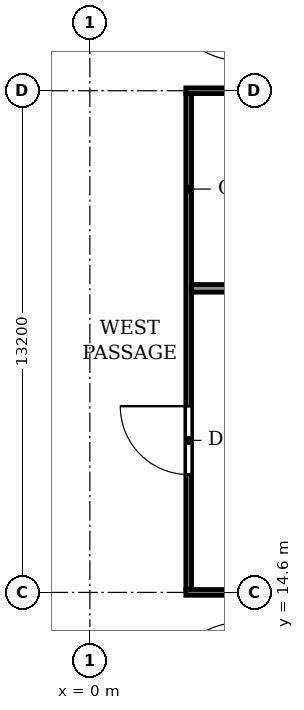
"""IFC4 building model, lengths in metres.
Left out: names, types, materials, properties, quantities, classifications, styles, units other than length and angle.
Written with IfcOpenShell. Run it as: python <this file> out.ifc"""

import sys

from ifc_helpers import new_model, si_unit, direction, frame, frame_2d, origin, place, context, subcontext, project, spatial, rectangle, extrude, element, fill, save


model = new_model("IFC4")
c1 = context("Model", 3, precision=1e-05, world=origin(), true_north=direction((0.0, 1.0)))
c2 = subcontext(c1, "Body", "Model", "MODEL_VIEW")
j1 = project(units=[si_unit("LENGTHUNIT", "METRE"), si_unit("PLANEANGLEUNIT", "RADIAN")], contexts=[c1])
p1 = place(None, origin())
s1 = spatial("IfcSite", under=j1, at=p1, CompositionType="ELEMENT")
p2 = place(p1, origin())
s2 = spatial("IfcBuilding", under=s1, at=p2, CompositionType="ELEMENT")
p3 = place(p2, frame((0.0, 0.0, 6.0)))
s3 = spatial("IfcBuildingStorey", under=s2, at=p3, CompositionType="ELEMENT", Elevation=6.0)
p4 = place(p3, frame((2.525, 14.6, 0.0), z_axis=(0.0, 0.0, 1.0), x_axis=(1.0, 0.0, 0.0)))
e1 = element("IfcWall", 1, at=p4, inside=s3, PredefinedType="PARTITIONING", context=c2, shape_type="SweptSolid", body=[
    extrude(rectangle(XDim=15.465, YDim=0.15, at=frame_2d((7.732, 0.0))), origin(), (0.0, 0.0, 1.0), 4.52),
])
p5 = place(p4, frame((11.175, 0.0, 0.0)))
e2 = element("IfcOpeningElement", 2, at=p5, cuts=e1, PredefinedType="OPENING", context=c2, shape_type="SweptSolid", body=[
    extrude(rectangle(XDim=0.9, YDim=2.1, at=frame_2d((0.45, 1.05))), frame((0.0, 0.085, 0.0), z_axis=(0.0, -1.0, 0.0), x_axis=(1.0, 0.0, 0.0)), (0.0, 0.0, 1.0), 0.17),
])
p6 = place(p3, frame((2.525, 27.8, 0.0), z_axis=(0.0, 0.0, 1.0), x_axis=(1.0, 0.0, 0.0)))
e3 = element("IfcWall", 3, at=p6, inside=s3, PredefinedType="PARTITIONING", context=c2, shape_type="SweptSolid", body=[
    extrude(rectangle(XDim=15.465, YDim=0.15, at=frame_2d((7.732, 0.0))), origin(), (0.0, 0.0, 1.0), 4.52),
])
p7 = place(p6, frame((3.475, 0.0, 0.0)))
e4 = element("IfcOpeningElement", 4, at=p7, cuts=e3, PredefinedType="OPENING", context=c2, shape_type="SweptSolid", body=[
    extrude(rectangle(XDim=0.9, YDim=2.1, at=frame_2d((0.45, 1.05))), frame((0.0, 0.085, 0.0), z_axis=(0.0, -1.0, 0.0), x_axis=(1.0, 0.0, 0.0)), (0.0, 0.0, 1.0), 0.17),
])
p8 = place(p6, frame((11.175, 0.0, 0.0)))
e5 = element("IfcOpeningElement", 5, at=p8, cuts=e3, PredefinedType="OPENING", context=c2, shape_type="SweptSolid", body=[
    extrude(rectangle(XDim=0.9, YDim=2.1, at=frame_2d((0.45, 1.05))), frame((0.0, 0.085, 0.0), z_axis=(0.0, -1.0, 0.0), x_axis=(1.0, 0.0, 0.0)), (0.0, 0.0, 1.0), 0.17),
])
p9 = place(p3, frame((2.6, 14.675, 0.0), z_axis=(0.0, 0.0, 1.0), x_axis=(0.0, 1.0, 0.0)))
e6 = element("IfcWall", 6, at=p9, inside=s3, PredefinedType="PARTITIONING", context=c2, shape_type="SweptSolid", body=[
    extrude(rectangle(XDim=13.05, YDim=0.15, at=frame_2d((6.525, 0.0))), origin(), (0.0, 0.0, 1.0), 4.52),
])
p10 = place(p9, frame((3.025, 0.0, 0.0)))
e7 = element("IfcOpeningElement", 7, at=p10, cuts=e6, PredefinedType="OPENING", context=c2, shape_type="SweptSolid", body=[
    extrude(rectangle(XDim=1.8, YDim=2.1, at=frame_2d((0.9, 1.05))), frame((0.0, 0.085, 0.0), z_axis=(0.0, -1.0, 0.0), x_axis=(1.0, 0.0, 0.0)), (0.0, 0.0, 1.0), 0.17),
])
p11 = place(p3, frame((2.675, 22.6, 0.0), z_axis=(0.0, 0.0, 1.0), x_axis=(1.0, 0.0, 0.0)))
e8 = element("IfcWall", 8, at=p11, inside=s3, PredefinedType="PARTITIONING", context=c2, shape_type="SweptSolid", body=[
    extrude(rectangle(XDim=15.25, YDim=0.2, at=frame_2d((7.625, 0.0))), origin(), (0.0, 0.0, 1.0), 4.52),
])
p12 = place(p10, origin())
e9 = element("IfcDoor", 9, at=p12, inside=s3, OperationType="DOUBLE_DOOR_SINGLE_SWING", PredefinedType="DOOR", context=c2, shape_type="SweptSolid", body=[
    extrude(rectangle(XDim=1.8, YDim=2.1, at=frame_2d((0.9, 1.05))), frame((0.0, 0.025, 0.0), z_axis=(0.0, -1.0, 0.0), x_axis=(1.0, 0.0, 0.0)), (0.0, 0.0, 1.0), 0.05),
])
fill(e7, e9)
save(model, sys.argv[1])
